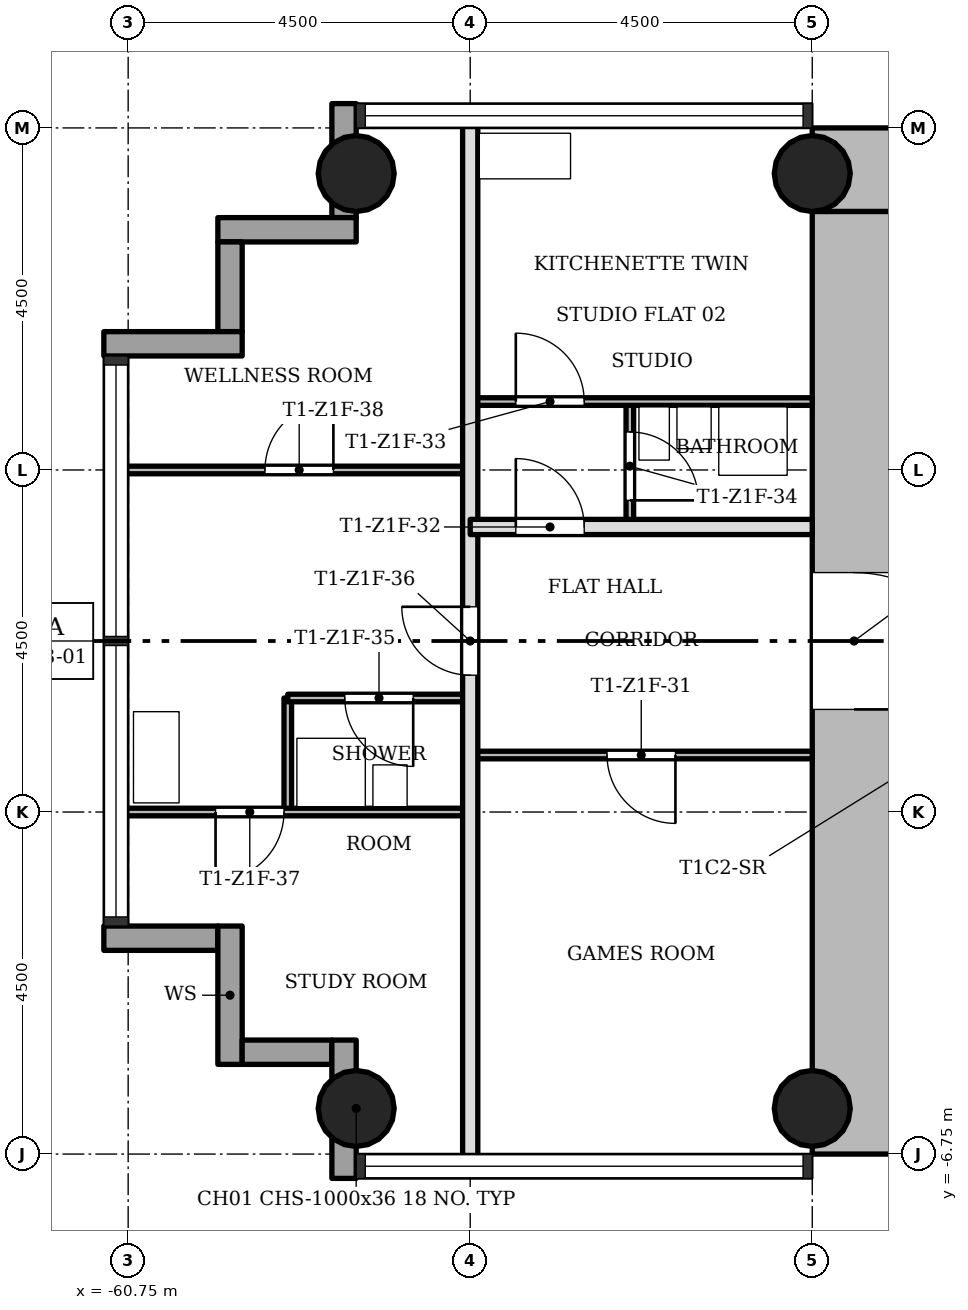
"""IFC4 building model, lengths in metres.
Left out: names, types, materials, properties, quantities, classifications, styles, units other than length and angle.
Written with IfcOpenShell. Run it as: python <this file> out.ifc"""

import sys

from ifc_helpers import new_model, si_unit, direction, frame, frame_2d, origin, origin_2d, place, context, subcontext, project, spatial, rectangle, hollow_circle, extrude, element, fill, save


model = new_model("IFC4")
c1 = context("Model", 3, precision=1e-05, world=origin(), true_north=direction((0.0, 1.0)))
c2 = subcontext(c1, "Body", "Model", "MODEL_VIEW")
j1 = project(units=[si_unit("LENGTHUNIT", "METRE"), si_unit("PLANEANGLEUNIT", "RADIAN")], contexts=[c1])
p1 = place(None, origin())
s1 = spatial("IfcSite", under=j1, at=p1, CompositionType="ELEMENT")
p2 = place(p1, origin())
s2 = spatial("IfcBuilding", under=s1, at=p2, CompositionType="ELEMENT")
p3 = place(p2, frame((0.0, 0.0, 68.7)))
s3 = spatial("IfcBuildingStorey", under=s2, at=p3, CompositionType="ELEMENT", Elevation=68.7)
p4 = place(p3, frame((-43.85, 6.2, 0.0), z_axis=(0.0, 0.0, 1.0), x_axis=(-1.0, 0.0, 0.0)))
e1 = element("IfcWall", 1, at=p4, inside=s3, PredefinedType="SHEAR", context=c2, shape_type="SweptSolid", body=[
    extrude(rectangle(XDim=7.9, YDim=1.1, at=frame_2d((3.95, 0.0))), origin(), (0.0, 0.0, 1.0), 3.4),
])
p5 = place(p3, frame((-51.2, 5.65, 0.0), z_axis=(0.0, 0.0, 1.0), x_axis=(0.0, -1.0, 0.0)))
e2 = element("IfcWall", 2, at=p5, inside=s3, PredefinedType="SHEAR", context=c2, shape_type="SweptSolid", body=[
    extrude(rectangle(XDim=12.4, YDim=1.1, at=frame_2d((6.2, 0.0))), origin(), (0.0, 0.0, 1.0), 3.4),
])
p6 = place(p5, frame((4.75, 0.0, 0.0)))
e3 = element("IfcOpeningElement", 3, at=p6, cuts=e2, PredefinedType="OPENING", context=c2, shape_type="SweptSolid", body=[
    extrude(rectangle(XDim=1.8, YDim=2.1, at=frame_2d((0.9, 1.05))), frame((0.0, 0.56, 0.0), z_axis=(0.0, -1.0, 0.0), x_axis=(1.0, 0.0, 0.0)), (0.0, 0.0, 1.0), 1.12),
])
for number, where, z_axis, x_axis in (
    (4, (-51.75, -6.15, 0.0), (0.0, 0.0, 1.0), (1.0, 0.0, 0.0)),
    (5, (-51.75, 6.15, 0.0), (0.0, 0.0, 1.0), (1.0, 0.0, 0.0)),
    (6, (-57.75, -6.15, 0.0), (0.0, 0.0, 1.0), (1.0, 0.0, 0.0)),
    (7, (-57.75, 6.15, 0.0), (0.0, 0.0, 1.0), (1.0, 0.0, 0.0)),
):
    element("IfcColumn", number, at=place(p3, frame(where, z_axis=z_axis, x_axis=x_axis)), inside=s3, PredefinedType="COLUMN", context=c2, shape_type="SweptSolid", body=[
        extrude(hollow_circle(Radius=0.5, WallThickness=0.036, at=origin_2d()), origin(), (0.0, 0.0, 1.0), 3.4),
    ])
p7 = place(p3, frame((-61.07, -3.91, -0.3), z_axis=(0.0, 0.0, 1.0), x_axis=(1.0, 0.0, 0.0)))
e8 = element("IfcWall", 8, at=p7, inside=s3, PredefinedType="STANDARD", context=c2, shape_type="SweptSolid", body=[
    extrude(rectangle(XDim=1.5, YDim=0.32, at=frame_2d((0.75, 0.0))), origin(), (0.0, 0.0, 1.0), 3.4),
])
p8 = place(p3, frame((-59.41, -3.75, -0.3), z_axis=(0.0, 0.0, 1.0), x_axis=(0.0, -1.0, 0.0)))
e9 = element("IfcWall", 9, at=p8, inside=s3, PredefinedType="STANDARD", context=c2, shape_type="SweptSolid", body=[
    extrude(rectangle(XDim=1.82, YDim=0.32, at=frame_2d((0.91, 0.0))), origin(), (0.0, 0.0, 1.0), 3.4),
])
p9 = place(p3, frame((-59.25, -5.41, -0.3), z_axis=(0.0, 0.0, 1.0), x_axis=(1.0, 0.0, 0.0)))
e10 = element("IfcWall", 10, at=p9, inside=s3, PredefinedType="STANDARD", context=c2, shape_type="SweptSolid", body=[
    extrude(rectangle(XDim=1.18, YDim=0.32, at=frame_2d((0.59, 0.0))), origin(), (0.0, 0.0, 1.0), 3.4),
])
p10 = place(p3, frame((-57.91, -5.25, -0.3), z_axis=(0.0, 0.0, 1.0), x_axis=(0.0, -1.0, 0.0)))
e11 = element("IfcWall", 11, at=p10, inside=s3, PredefinedType="STANDARD", context=c2, shape_type="SweptSolid", body=[
    extrude(rectangle(XDim=1.82, YDim=0.32, at=frame_2d((0.91, 0.0))), origin(), (0.0, 0.0, 1.0), 3.4),
])
p11 = place(p3, frame((-57.91, 7.07, -0.3), z_axis=(0.0, 0.0, 1.0), x_axis=(0.0, -1.0, 0.0)))
e12 = element("IfcWall", 12, at=p11, inside=s3, PredefinedType="STANDARD", context=c2, shape_type="SweptSolid", body=[
    extrude(rectangle(XDim=1.5, YDim=0.32, at=frame_2d((0.75, 0.0))), origin(), (0.0, 0.0, 1.0), 3.4),
])
p12 = place(p3, frame((-57.75, 5.41, -0.3), z_axis=(0.0, 0.0, 1.0), x_axis=(-1.0, 0.0, 0.0)))
e13 = element("IfcWall", 13, at=p12, inside=s3, PredefinedType="STANDARD", context=c2, shape_type="SweptSolid", body=[
    extrude(rectangle(XDim=1.82, YDim=0.32, at=frame_2d((0.91, 0.0))), origin(), (0.0, 0.0, 1.0), 3.4),
])
p13 = place(p3, frame((-59.41, 5.25, -0.3), z_axis=(0.0, 0.0, 1.0), x_axis=(0.0, -1.0, 0.0)))
e14 = element("IfcWall", 14, at=p13, inside=s3, PredefinedType="STANDARD", context=c2, shape_type="SweptSolid", body=[
    extrude(rectangle(XDim=1.18, YDim=0.32, at=frame_2d((0.59, 0.0))), origin(), (0.0, 0.0, 1.0), 3.4),
])
p14 = place(p3, frame((-59.25, 3.91, -0.3), z_axis=(0.0, 0.0, 1.0), x_axis=(-1.0, 0.0, 0.0)))
e15 = element("IfcWall", 15, at=p14, inside=s3, PredefinedType="STANDARD", context=c2, shape_type="SweptSolid", body=[
    extrude(rectangle(XDim=1.82, YDim=0.32, at=frame_2d((0.91, 0.0))), origin(), (0.0, 0.0, 1.0), 3.4),
])
p15 = place(p3, frame((-58.65, -2.25, 0.0), z_axis=(0.0, 0.0, 1.0), x_axis=(0.0, 1.0, 0.0)))
e16 = element("IfcWall", 16, at=p15, inside=s3, PredefinedType="PARTITIONING", context=c2, shape_type="SweptSolid", body=[
    extrude(rectangle(XDim=1.5, YDim=0.1, at=frame_2d((0.75, 0.0))), origin(), (0.0, 0.0, 1.0), 3.0),
])
p16 = place(p3, frame((-56.25, -6.85, 0.0), z_axis=(0.0, 0.0, 1.0), x_axis=(0.0, 1.0, 0.0)))
e17 = element("IfcWall", 17, at=p16, inside=s3, PredefinedType="SOLIDWALL", context=c2, shape_type="SweptSolid", body=[
    extrude(rectangle(XDim=13.7, YDim=0.2, at=frame_2d((6.85, 0.0))), origin(), (0.0, 0.0, 1.0), 3.0),
])
p17 = place(p16, frame((6.4, 0.0, 0.0)))
e18 = element("IfcOpeningElement", 18, at=p17, cuts=e17, PredefinedType="OPENING", context=c2, shape_type="SweptSolid", body=[
    extrude(rectangle(XDim=0.9, YDim=2.1, at=frame_2d((0.45, 1.05))), frame((0.0, 0.11, 0.0), z_axis=(0.0, -1.0, 0.0), x_axis=(1.0, 0.0, 0.0)), (0.0, 0.0, 1.0), 0.22),
])
p18 = place(p3, frame((-54.15, 1.5, 0.0), z_axis=(0.0, 0.0, 1.0), x_axis=(0.0, 1.0, 0.0)))
e19 = element("IfcWall", 19, at=p18, inside=s3, PredefinedType="PARTITIONING", context=c2, shape_type="SweptSolid", body=[
    extrude(rectangle(XDim=1.65, YDim=0.1, at=frame_2d((0.825, 0.0))), origin(), (0.0, 0.0, 1.0), 3.0),
])
p19 = place(p18, frame((0.35, 0.0, 0.0)))
e20 = element("IfcOpeningElement", 20, at=p19, cuts=e19, PredefinedType="OPENING", context=c2, shape_type="SweptSolid", body=[
    extrude(rectangle(XDim=0.9, YDim=2.1, at=frame_2d((0.45, 1.05))), frame((0.0, 0.06, 0.0), z_axis=(0.0, -1.0, 0.0), x_axis=(1.0, 0.0, 0.0)), (0.0, 0.0, 1.0), 0.12),
])
p20 = place(p3, frame((-60.85, -2.25, 0.0), z_axis=(0.0, 0.0, 1.0), x_axis=(1.0, 0.0, 0.0)))
e21 = element("IfcWall", 21, at=p20, inside=s3, PredefinedType="PARTITIONING", context=c2, shape_type="SweptSolid", body=[
    extrude(rectangle(XDim=4.6, YDim=0.1, at=frame_2d((2.3, 0.0))), origin(), (0.0, 0.0, 1.0), 3.0),
])
p21 = place(p20, frame((1.25, 0.0, 0.0)))
e22 = element("IfcOpeningElement", 22, at=p21, cuts=e21, PredefinedType="OPENING", context=c2, shape_type="SweptSolid", body=[
    extrude(rectangle(XDim=0.9, YDim=2.1, at=frame_2d((0.45, 1.05))), frame((0.0, 0.06, 0.0), z_axis=(0.0, -1.0, 0.0), x_axis=(1.0, 0.0, 0.0)), (0.0, 0.0, 1.0), 0.12),
])
p22 = place(p3, frame((-56.25, -1.5, 0.0), z_axis=(0.0, 0.0, 1.0), x_axis=(1.0, 0.0, 0.0)))
e23 = element("IfcWall", 23, at=p22, inside=s3, PredefinedType="PARTITIONING", context=c2, shape_type="SweptSolid", body=[
    extrude(rectangle(XDim=4.5, YDim=0.1, at=frame_2d((2.25, 0.0))), origin(), (0.0, 0.0, 1.0), 3.0),
])
p23 = place(p22, frame((1.8, 0.0, 0.0)))
e24 = element("IfcOpeningElement", 24, at=p23, cuts=e23, PredefinedType="OPENING", context=c2, shape_type="SweptSolid", body=[
    extrude(rectangle(XDim=0.9, YDim=2.1, at=frame_2d((0.45, 1.05))), frame((0.0, 0.06, 0.0), z_axis=(0.0, -1.0, 0.0), x_axis=(1.0, 0.0, 0.0)), (0.0, 0.0, 1.0), 0.12),
])
p24 = place(p3, frame((-58.65, -0.75, 0.0), z_axis=(0.0, 0.0, 1.0), x_axis=(1.0, 0.0, 0.0)))
e25 = element("IfcWall", 25, at=p24, inside=s3, PredefinedType="PARTITIONING", context=c2, shape_type="SweptSolid", body=[
    extrude(rectangle(XDim=2.4, YDim=0.1, at=frame_2d((1.2, 0.0))), origin(), (0.0, 0.0, 1.0), 3.0),
])
p25 = place(p24, frame((0.75, 0.0, 0.0)))
e26 = element("IfcOpeningElement", 26, at=p25, cuts=e25, PredefinedType="OPENING", context=c2, shape_type="SweptSolid", body=[
    extrude(rectangle(XDim=0.9, YDim=2.1, at=frame_2d((0.45, 1.05))), frame((0.0, 0.06, 0.0), z_axis=(0.0, -1.0, 0.0), x_axis=(1.0, 0.0, 0.0)), (0.0, 0.0, 1.0), 0.12),
])
p26 = place(p3, frame((-56.25, 1.5, 0.0), z_axis=(0.0, 0.0, 1.0), x_axis=(1.0, 0.0, 0.0)))
e27 = element("IfcWall", 27, at=p26, inside=s3, PredefinedType="SOLIDWALL", context=c2, shape_type="SweptSolid", body=[
    extrude(rectangle(XDim=4.5, YDim=0.2, at=frame_2d((2.25, 0.0))), origin(), (0.0, 0.0, 1.0), 3.0),
])
p27 = place(p26, frame((0.6, 0.0, 0.0)))
e28 = element("IfcOpeningElement", 28, at=p27, cuts=e27, PredefinedType="OPENING", context=c2, shape_type="SweptSolid", body=[
    extrude(rectangle(XDim=0.9, YDim=2.1, at=frame_2d((0.45, 1.05))), frame((0.0, 0.11, 0.0), z_axis=(0.0, -1.0, 0.0), x_axis=(1.0, 0.0, 0.0)), (0.0, 0.0, 1.0), 0.22),
])
p28 = place(p3, frame((-60.85, 2.25, 0.0), z_axis=(0.0, 0.0, 1.0), x_axis=(1.0, 0.0, 0.0)))
e29 = element("IfcWall", 29, at=p28, inside=s3, PredefinedType="PARTITIONING", context=c2, shape_type="SweptSolid", body=[
    extrude(rectangle(XDim=4.6, YDim=0.1, at=frame_2d((2.3, 0.0))), origin(), (0.0, 0.0, 1.0), 3.0),
])
p29 = place(p28, frame((1.9, 0.0, 0.0)))
e30 = element("IfcOpeningElement", 30, at=p29, cuts=e29, PredefinedType="OPENING", context=c2, shape_type="SweptSolid", body=[
    extrude(rectangle(XDim=0.9, YDim=2.1, at=frame_2d((0.45, 1.05))), frame((0.0, 0.06, 0.0), z_axis=(0.0, -1.0, 0.0), x_axis=(1.0, 0.0, 0.0)), (0.0, 0.0, 1.0), 0.12),
])
p30 = place(p3, frame((-56.25, 3.15, 0.0), z_axis=(0.0, 0.0, 1.0), x_axis=(1.0, 0.0, 0.0)))
e31 = element("IfcWall", 31, at=p30, inside=s3, PredefinedType="PARTITIONING", context=c2, shape_type="SweptSolid", body=[
    extrude(rectangle(XDim=4.5, YDim=0.1, at=frame_2d((2.25, 0.0))), origin(), (0.0, 0.0, 1.0), 3.0),
])
p31 = place(p30, frame((0.6, 0.0, 0.0)))
e32 = element("IfcOpeningElement", 32, at=p31, cuts=e31, PredefinedType="OPENING", context=c2, shape_type="SweptSolid", body=[
    extrude(rectangle(XDim=0.9, YDim=2.1, at=frame_2d((0.45, 1.05))), frame((0.0, 0.06, 0.0), z_axis=(0.0, -1.0, 0.0), x_axis=(1.0, 0.0, 0.0)), (0.0, 0.0, 1.0), 0.12),
])
p32 = place(p23, origin())
e33 = element("IfcDoor", 33, at=p32, inside=s3, OperationType="SINGLE_SWING_RIGHT", PredefinedType="DOOR", context=c2, shape_type="SweptSolid", body=[
    extrude(rectangle(XDim=0.9, YDim=2.1, at=frame_2d((0.45, 1.05))), frame((0.0, 0.025, 0.0), z_axis=(0.0, -1.0, 0.0), x_axis=(1.0, 0.0, 0.0)), (0.0, 0.0, 1.0), 0.05),
])
fill(e24, e33)
p33 = place(p27, origin())
e34 = element("IfcDoor", 34, at=p33, inside=s3, OperationType="SINGLE_SWING_RIGHT", PredefinedType="DOOR", context=c2, shape_type="SweptSolid", body=[
    extrude(rectangle(XDim=0.9, YDim=2.1, at=frame_2d((0.45, 1.05))), frame((0.0, 0.025, 0.0), z_axis=(0.0, -1.0, 0.0), x_axis=(1.0, 0.0, 0.0)), (0.0, 0.0, 1.0), 0.05),
])
fill(e28, e34)
p34 = place(p31, origin())
e35 = element("IfcDoor", 35, at=p34, inside=s3, OperationType="SINGLE_SWING_RIGHT", PredefinedType="DOOR", context=c2, shape_type="SweptSolid", body=[
    extrude(rectangle(XDim=0.9, YDim=2.1, at=frame_2d((0.45, 1.05))), frame((0.0, 0.025, 0.0), z_axis=(0.0, -1.0, 0.0), x_axis=(1.0, 0.0, 0.0)), (0.0, 0.0, 1.0), 0.05),
])
fill(e32, e35)
p35 = place(p19, origin())
e36 = element("IfcDoor", 36, at=p35, inside=s3, OperationType="SINGLE_SWING_LEFT", PredefinedType="DOOR", context=c2, shape_type="SweptSolid", body=[
    extrude(rectangle(XDim=0.9, YDim=2.1, at=frame_2d((0.45, 1.05))), frame((0.0, 0.025, 0.0), z_axis=(0.0, -1.0, 0.0), x_axis=(1.0, 0.0, 0.0)), (0.0, 0.0, 1.0), 0.05),
])
fill(e20, e36)
p36 = place(p25, origin())
e37 = element("IfcDoor", 37, at=p36, inside=s3, OperationType="SINGLE_SWING_RIGHT", PredefinedType="DOOR", context=c2, shape_type="SweptSolid", body=[
    extrude(rectangle(XDim=0.9, YDim=2.1, at=frame_2d((0.45, 1.05))), frame((0.0, 0.025, 0.0), z_axis=(0.0, -1.0, 0.0), x_axis=(1.0, 0.0, 0.0)), (0.0, 0.0, 1.0), 0.05),
])
fill(e26, e37)
p37 = place(p17, origin())
e38 = element("IfcDoor", 38, at=p37, inside=s3, OperationType="SINGLE_SWING_LEFT", PredefinedType="DOOR", context=c2, shape_type="SweptSolid", body=[
    extrude(rectangle(XDim=0.9, YDim=2.1, at=frame_2d((0.45, 1.05))), frame((0.0, 0.025, 0.0), z_axis=(0.0, -1.0, 0.0), x_axis=(1.0, 0.0, 0.0)), (0.0, 0.0, 1.0), 0.05),
])
fill(e18, e38)
p38 = place(p21, origin())
e39 = element("IfcDoor", 39, at=p38, inside=s3, OperationType="SINGLE_SWING_LEFT", PredefinedType="DOOR", context=c2, shape_type="SweptSolid", body=[
    extrude(rectangle(XDim=0.9, YDim=2.1, at=frame_2d((0.45, 1.05))), frame((0.0, 0.025, 0.0), z_axis=(0.0, -1.0, 0.0), x_axis=(1.0, 0.0, 0.0)), (0.0, 0.0, 1.0), 0.05),
])
fill(e22, e39)
p39 = place(p29, origin())
e40 = element("IfcDoor", 40, at=p39, inside=s3, OperationType="SINGLE_SWING_LEFT", PredefinedType="DOOR", context=c2, shape_type="SweptSolid", body=[
    extrude(rectangle(XDim=0.9, YDim=2.1, at=frame_2d((0.45, 1.05))), frame((0.0, 0.025, 0.0), z_axis=(0.0, -1.0, 0.0), x_axis=(1.0, 0.0, 0.0)), (0.0, 0.0, 1.0), 0.05),
])
fill(e30, e40)
p40 = place(p6, origin())
e41 = element("IfcDoor", 41, at=p40, inside=s3, OperationType="SINGLE_SWING_LEFT", PredefinedType="DOOR", context=c2, shape_type="SweptSolid", body=[
    extrude(rectangle(XDim=1.8, YDim=2.1, at=frame_2d((0.9, 1.05))), frame((0.0, 0.025, 0.0), z_axis=(0.0, -1.0, 0.0), x_axis=(1.0, 0.0, 0.0)), (0.0, 0.0, 1.0), 0.05),
])
fill(e3, e41)
save(model, sys.argv[1])
